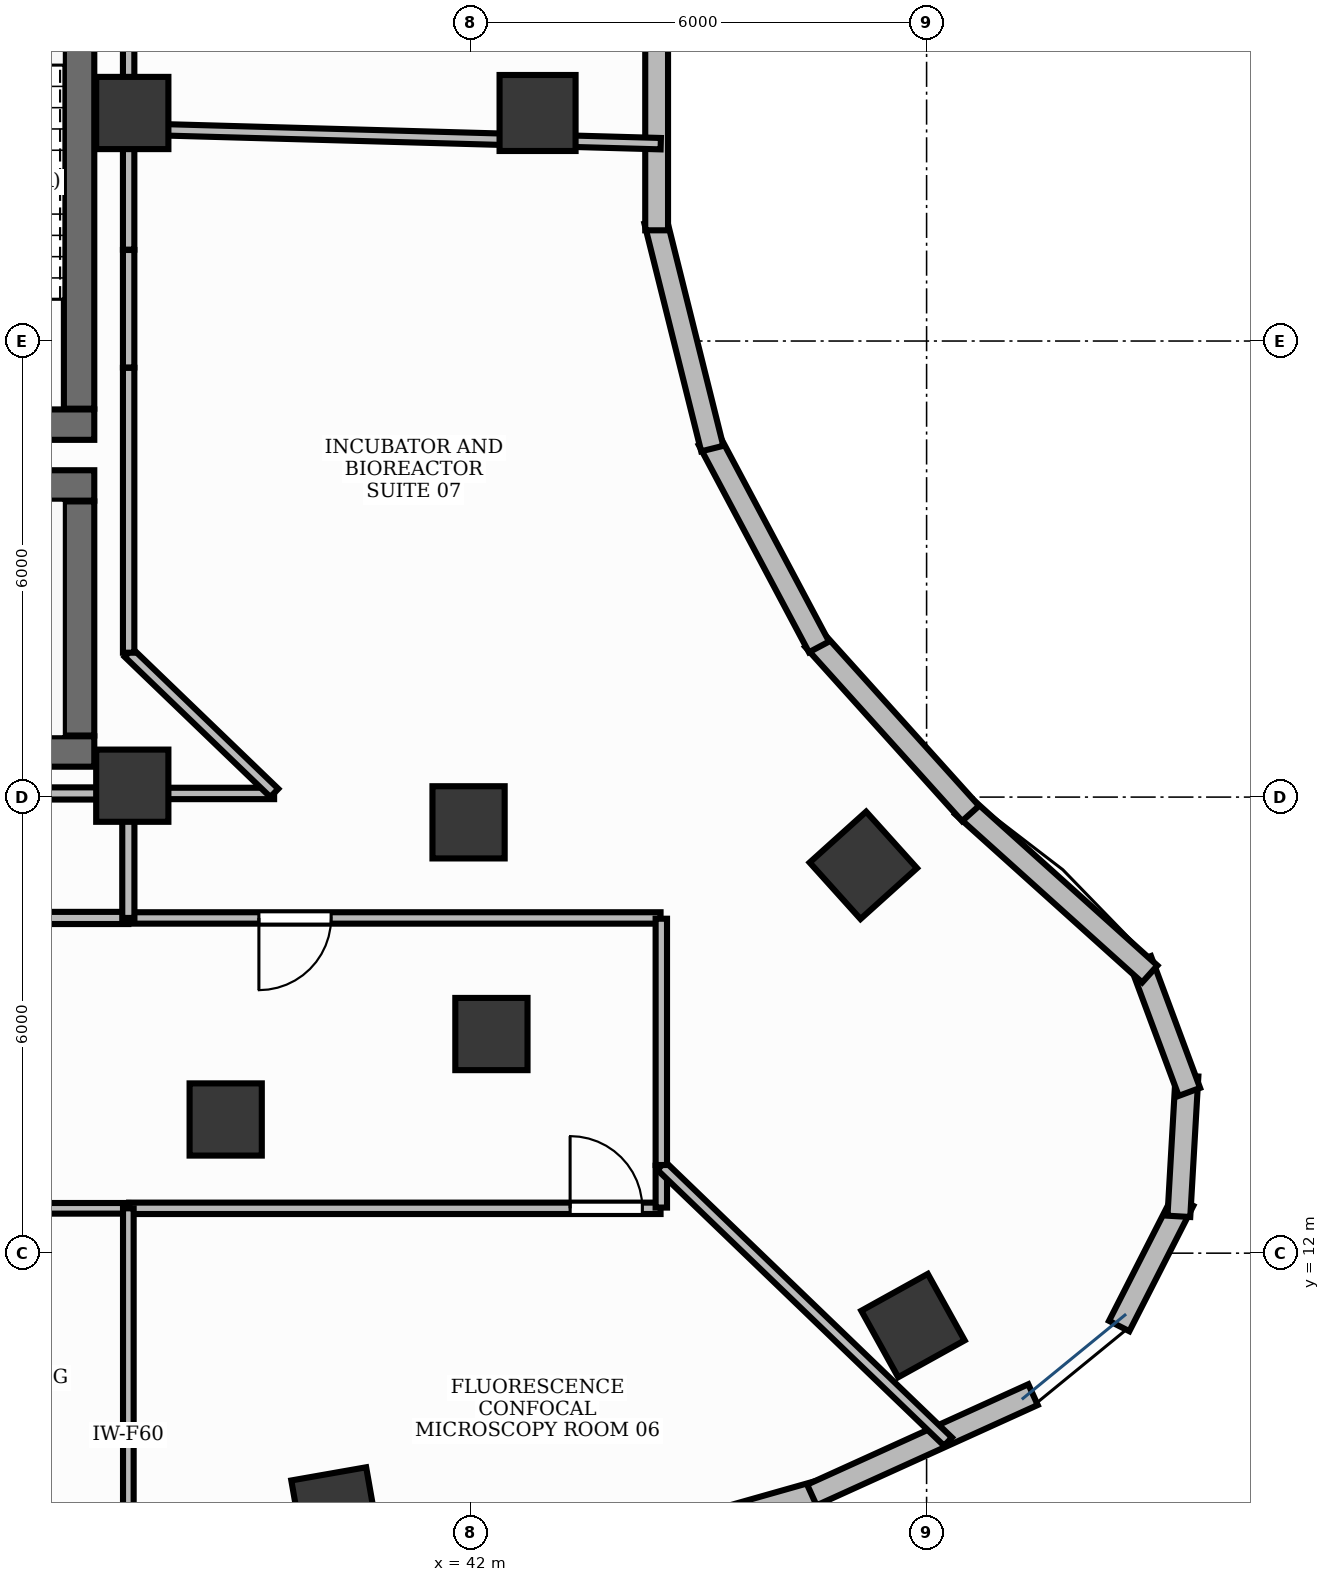
"""IFC4 building model, lengths in metres.
Left out: names, types, materials, properties, quantities, classifications, styles, units other than length and angle.
Written with IfcOpenShell. Run it as: python <this file> out.ifc"""

import sys

from ifc_helpers import new_model, si_unit, direction, frame, frame_2d, origin, origin_2d, place, context, subcontext, project, spatial, rectangle, extrude, element, fill, save


model = new_model("IFC4")
c1 = context("Model", 3, precision=1e-05, world=origin(), true_north=direction((0.0, 1.0)))
c2 = subcontext(c1, "Body", "Model", "MODEL_VIEW")
j1 = project(units=[si_unit("LENGTHUNIT", "METRE"), si_unit("PLANEANGLEUNIT", "RADIAN")], contexts=[c1])
p1 = place(None, origin())
s1 = spatial("IfcSite", under=j1, at=p1, CompositionType="ELEMENT")
p2 = place(p1, origin())
s2 = spatial("IfcBuilding", under=s1, at=p2, CompositionType="ELEMENT")
p3 = place(p2, frame((0.0, 0.0, 158.4)))
s3 = spatial("IfcBuildingStorey", under=s2, at=p3, CompositionType="ELEMENT", Elevation=158.4)
p4 = place(p3, frame((28.852, 18.6, 0.0), z_axis=(0.0, 0.0, 1.0), x_axis=(1.0, 0.0, 0.0)))
e1 = element("IfcWall", 1, at=p4, inside=s3, PredefinedType="SHEAR", context=c2, shape_type="SweptSolid", body=[
    extrude(rectangle(XDim=8.198, YDim=0.4, at=frame_2d((4.099, 0.0))), origin(), (0.0, 0.0, 1.0), 3.9),
])
p5 = place(p3, frame((28.4, 22.1, 0.0), z_axis=(0.0, 0.0, 1.0), x_axis=(1.0, 0.0, 0.0)))
e2 = element("IfcWall", 2, at=p5, inside=s3, PredefinedType="SHEAR", context=c2, shape_type="SweptSolid", body=[
    extrude(rectangle(XDim=8.65, YDim=0.4, at=frame_2d((4.325, 0.0))), origin(), (0.0, 0.0, 1.0), 3.9),
])
p6 = place(p3, frame((36.85, 18.81, 0.0), z_axis=(0.0, 0.0, 1.0), x_axis=(0.0, 1.0, 0.0)))
e3 = element("IfcWall", 3, at=p6, inside=s3, PredefinedType="SHEAR", context=c2, shape_type="SweptSolid", body=[
    extrude(rectangle(XDim=3.08, YDim=0.4, at=frame_2d((1.54, 0.0))), origin(), (0.0, 0.0, 1.0), 3.9),
])
p7 = place(p3, frame((33.15, 22.9, 0.0), z_axis=(0.0, 0.0, 1.0), x_axis=(1.0, 0.0, 0.0)))
e4 = element("IfcWall", 4, at=p7, inside=s3, PredefinedType="SHEAR", context=c2, shape_type="SweptSolid", body=[
    extrude(rectangle(XDim=3.9, YDim=0.4, at=frame_2d((1.95, 0.0))), origin(), (0.0, 0.0, 1.0), 3.9),
])
p8 = place(p3, frame((36.85, 23.11, 0.0), z_axis=(0.0, 0.0, 1.0), x_axis=(0.0, 1.0, 0.0)))
e5 = element("IfcWall", 5, at=p8, inside=s3, PredefinedType="SHEAR", context=c2, shape_type="SweptSolid", body=[
    extrude(rectangle(XDim=7.78, YDim=0.4, at=frame_2d((3.89, 0.0))), origin(), (0.0, 0.0, 1.0), 3.9),
])
for number, where, z_axis, x_axis in (
    (6, (37.55, 18.15, -0.0), (0.0, 0.0, 1.0), (1.0, 0.0, 0.0)),
    (7, (37.55, 27.0, -0.0), (0.0, 0.0, 1.0), (1.0, 0.0, 0.0)),
):
    element("IfcColumn", number, at=place(p3, frame(where, z_axis=z_axis, x_axis=x_axis)), inside=s3, PredefinedType="PILASTER", context=c2, shape_type="SweptSolid", body=[
        extrude(rectangle(XDim=0.95, YDim=0.95, at=origin_2d()), origin(), (0.0, 0.0, 1.0), 3.901),
    ])
p9 = place(p3, frame((40.221, 8.604, -0.0), z_axis=(0.0, 0.0, 1.0), x_axis=(0.984868307662, 0.173304404339, 0.0)))
e8 = element("IfcColumn", 8, at=p9, inside=s3, PredefinedType="COLUMN", context=c2, shape_type="SweptSolid", body=[
    extrude(rectangle(XDim=1.0, YDim=1.0, at=origin_2d()), origin(), (0.0, 0.0, 1.0), 3.901),
])
p10 = place(p3, frame((38.779, 13.759, -0.0), z_axis=(0.0, 0.0, 1.0), x_axis=(1.0, 0.0, 0.0)))
e9 = element("IfcColumn", 9, at=p10, inside=s3, PredefinedType="COLUMN", context=c2, shape_type="SweptSolid", body=[
    extrude(rectangle(XDim=0.95, YDim=0.95, at=origin_2d()), origin(), (0.0, 0.0, 1.0), 3.901),
])
p11 = place(p3, frame((47.821, 11.047, -0.0), z_axis=(0.0, 0.0, 1.0), x_axis=(0.874535078577, 0.484962262797, 0.0)))
e10 = element("IfcColumn", 10, at=p11, inside=s3, PredefinedType="COLUMN", context=c2, shape_type="SweptSolid", body=[
    extrude(rectangle(XDim=1.0, YDim=1.0, at=origin_2d()), origin(), (0.0, 0.0, 1.0), 3.901),
])
p12 = place(p3, frame((42.275, 14.883, -0.0), z_axis=(0.0, 0.0, 1.0), x_axis=(1.0, 0.0, 0.0)))
e11 = element("IfcColumn", 11, at=p12, inside=s3, PredefinedType="COLUMN", context=c2, shape_type="SweptSolid", body=[
    extrude(rectangle(XDim=0.95, YDim=0.95, at=origin_2d()), origin(), (0.0, 0.0, 1.0), 3.901),
])
p13 = place(p3, frame((47.167, 17.102, -0.0), z_axis=(0.0, 0.0, 1.0), x_axis=(-0.669130606359, 0.743144825477, 0.0)))
e12 = element("IfcColumn", 12, at=p13, inside=s3, PredefinedType="COLUMN", context=c2, shape_type="SweptSolid", body=[
    extrude(rectangle(XDim=1.0, YDim=1.0, at=origin_2d()), origin(), (0.0, 0.0, 1.0), 3.901),
])
p14 = place(p3, frame((41.974, 17.668, -0.0), z_axis=(0.0, 0.0, 1.0), x_axis=(1.0, 0.0, 0.0)))
e13 = element("IfcColumn", 13, at=p14, inside=s3, PredefinedType="COLUMN", context=c2, shape_type="SweptSolid", body=[
    extrude(rectangle(XDim=0.95, YDim=0.95, at=origin_2d()), origin(), (0.0, 0.0, 1.0), 3.901),
])
p15 = place(p3, frame((42.882, 27.0, -0.0), z_axis=(0.0, 0.0, 1.0), x_axis=(0.0, 1.0, 0.0)))
e14 = element("IfcColumn", 14, at=p15, inside=s3, PredefinedType="COLUMN", context=c2, shape_type="SweptSolid", body=[
    extrude(rectangle(XDim=1.0, YDim=1.0, at=origin_2d()), origin(), (0.0, 0.0, 1.0), 3.901),
])
p16 = place(p3, frame((40.493, 7.134, 0.0), z_axis=(0.0, 0.0, 1.0), x_axis=(0.962163849422, 0.272471515694, 0.0)))
e15 = element("IfcWall", 15, at=p16, inside=s3, PredefinedType="STANDARD", context=c2, shape_type="SweptSolid", body=[
    extrude(rectangle(XDim=6.409, YDim=0.3, at=frame_2d((3.205, 0.0))), origin(), (0.0, 0.0, 1.0), 3.9),
])
p17 = place(p3, frame((46.49, 8.818, 0.0), z_axis=(0.0, 0.0, 1.0), x_axis=(0.910633193525, 0.413215666268, 0.0)))
e16 = element("IfcWall", 16, at=p17, inside=s3, PredefinedType="STANDARD", context=c2, shape_type="SweptSolid", body=[
    extrude(rectangle(XDim=3.195, YDim=0.3, at=frame_2d((1.598, 0.0))), origin(), (0.0, 0.0, 1.0), 3.9),
])
for number, where, z_axis, x_axis in (
    (17, (50.534, 11.041, 0.0), (0.0, 0.0, 1.0), (0.454, 0.891, 0.0)),
    (18, (51.319, 12.484, 0.0), (0.0, 0.0, 1.0), (0.057, 0.998, 0.0)),
    (19, (51.458, 14.121, 0.0), (0.0, 0.0, 1.0), (-0.349, 0.937, 0.0)),
):
    element("IfcWall", number, at=place(p3, frame(where, z_axis=z_axis, x_axis=x_axis)), inside=s3, PredefinedType="STANDARD", context=c2, shape_type="SweptSolid", body=[
        extrude(rectangle(XDim=1.852, YDim=0.3, at=frame_2d((0.926, 0.0))), origin(), (0.0, 0.0, 1.0), 3.9),
    ])
p18 = place(p3, frame((50.936, 15.673, 0.0), z_axis=(0.0, 0.0, 1.0), x_axis=(-0.743341827472, 0.668911748687, 0.0)))
e20 = element("IfcWall", 20, at=p18, inside=s3, PredefinedType="STANDARD", context=c2, shape_type="SweptSolid", body=[
    extrude(rectangle(XDim=3.31, YDim=0.3, at=frame_2d((1.655, 0.0))), origin(), (0.0, 0.0, 1.0), 3.9),
])
for number, where, z_axis, x_axis in (
    (21, (48.579, 17.784, 0.0), (0.0, 0.0, 1.0), (-0.669, 0.743, 0.0)),
    (22, (46.584, 19.976, 0.0), (0.0, 0.0, 1.0), (-0.469, 0.883, 0.0)),
    (23, (45.18, 22.585, 0.0), (0.0, 0.0, 1.0), (-0.242, 0.97, 0.0)),
    (24, (44.448, 25.457, 0.0), (0.0, 0.0, 1.0), (0.0, 1.0, 0.0)),
):
    element("IfcWall", number, at=place(p3, frame(where, z_axis=z_axis, x_axis=x_axis)), inside=s3, PredefinedType="STANDARD", context=c2, shape_type="SweptSolid", body=[
        extrude(rectangle(XDim=3.087, YDim=0.3, at=frame_2d((1.543, 0.0))), origin(), (0.0, 0.0, 1.0), 3.9),
    ])
p19 = place(p3, frame((37.498, 16.41, 0.0), z_axis=(0.0, 0.0, 1.0), x_axis=(-1.0, 0.0, 0.0)))
e25 = element("IfcWall", 25, at=p19, inside=s3, PredefinedType="PARTITIONING", context=c2, shape_type="SweptSolid", body=[
    extrude(rectangle(XDim=8.498, YDim=0.16, at=frame_2d((4.249, 0.0))), origin(), (0.0, 0.0, 1.0), 2.91),
])
p20 = place(p19, frame((3.372, 0.0, 0.0)))
e26 = element("IfcOpeningElement", 26, at=p20, cuts=e25, PredefinedType="OPENING", context=c2, shape_type="SweptSolid", body=[
    extrude(rectangle(XDim=0.95, YDim=2.15, at=frame_2d((0.475, 1.075))), frame((0.0, 0.095, 0.0), z_axis=(0.0, -1.0, 0.0), x_axis=(1.0, 0.0, 0.0)), (0.0, 0.0, 1.0), 0.19),
])
p21 = place(p3, frame((32.695, 12.59, 0.0), z_axis=(0.0, 0.0, 1.0), x_axis=(1.0, 0.0, 0.0)))
e27 = element("IfcWall", 27, at=p21, inside=s3, PredefinedType="PARTITIONING", context=c2, shape_type="SweptSolid", body=[
    extrude(rectangle(XDim=4.803, YDim=0.14, at=frame_2d((2.401, 0.0))), origin(), (0.0, 0.0, 1.0), 2.91),
])
p22 = place(p21, frame((0.24, 0.0, 0.0)))
e28 = element("IfcOpeningElement", 28, at=p22, cuts=e27, PredefinedType="OPENING", context=c2, shape_type="SweptSolid", body=[
    extrude(rectangle(XDim=0.95, YDim=2.15, at=frame_2d((0.475, 1.075))), frame((0.0, 0.085, 0.0), z_axis=(0.0, -1.0, 0.0), x_axis=(1.0, 0.0, 0.0)), (0.0, 0.0, 1.0), 0.17),
])
p23 = place(p3, frame((37.508, 12.59, 0.0), z_axis=(0.0, 0.0, 1.0), x_axis=(1.0, 0.0, 0.0)))
e29 = element("IfcWall", 29, at=p23, inside=s3, PredefinedType="PARTITIONING", context=c2, shape_type="SweptSolid", body=[
    extrude(rectangle(XDim=6.992, YDim=0.15, at=frame_2d((3.496, 0.0))), origin(), (0.0, 0.0, 1.0), 2.91),
])
p24 = place(p23, frame((5.802, 0.0, 0.0)))
e30 = element("IfcOpeningElement", 30, at=p24, cuts=e29, PredefinedType="OPENING", context=c2, shape_type="SweptSolid", body=[
    extrude(rectangle(XDim=0.95, YDim=2.15, at=frame_2d((0.475, 1.075))), frame((0.0, 0.09, 0.0), z_axis=(0.0, -1.0, 0.0), x_axis=(1.0, 0.0, 0.0)), (0.0, 0.0, 1.0), 0.18),
])
p25 = place(p3, frame((44.5, 16.41, 0.0), z_axis=(0.0, 0.0, 1.0), x_axis=(-1.0, 0.0, 0.0)))
e31 = element("IfcWall", 31, at=p25, inside=s3, PredefinedType="PARTITIONING", context=c2, shape_type="SweptSolid", body=[
    extrude(rectangle(XDim=6.992, YDim=0.15, at=frame_2d((3.496, 0.0))), origin(), (0.0, 0.0, 1.0), 2.91),
])
p26 = place(p25, frame((4.334, 0.0, 0.0)))
e32 = element("IfcOpeningElement", 32, at=p26, cuts=e31, PredefinedType="OPENING", context=c2, shape_type="SweptSolid", body=[
    extrude(rectangle(XDim=0.95, YDim=2.15, at=frame_2d((0.475, 1.075))), frame((0.0, 0.09, 0.0), z_axis=(0.0, -1.0, 0.0), x_axis=(1.0, 0.0, 0.0)), (0.0, 0.0, 1.0), 0.18),
])
p27 = place(p3, frame((31.717, 18.048, 0.0), z_axis=(0.0, 0.0, 1.0), x_axis=(1.0, 0.0, 0.0)))
e33 = element("IfcWall", 33, at=p27, inside=s3, PredefinedType="PARTITIONING", context=c2, shape_type="SweptSolid", body=[
    extrude(rectangle(XDim=5.781, YDim=0.16, at=frame_2d((2.89, 0.0))), origin(), (0.0, 0.0, 1.0), 2.91),
])
p28 = place(p3, frame((37.498, 18.048, 0.0), z_axis=(0.0, 0.0, 1.0), x_axis=(0.0, -1.0, 0.0)))
e34 = element("IfcWall", 34, at=p28, inside=s3, PredefinedType="PARTITIONING", context=c2, shape_type="SweptSolid", body=[
    extrude(rectangle(XDim=1.638, YDim=0.16, at=frame_2d((0.819, 0.0))), origin(), (0.0, 0.0, 1.0), 2.91),
])
p29 = place(p3, frame((37.498, 12.59, 0.0), z_axis=(0.0, 0.0, 1.0), x_axis=(0.0, -1.0, 0.0)))
e35 = element("IfcWall", 35, at=p29, inside=s3, PredefinedType="PARTITIONING", context=c2, shape_type="SweptSolid", body=[
    extrude(rectangle(XDim=5.963, YDim=0.14, at=frame_2d((2.981, 0.0))), origin(), (0.0, 0.0, 1.0), 2.91),
])
p30 = place(p3, frame((44.51, 12.6, 0.0), z_axis=(0.0, 0.0, 1.0), x_axis=(0.0, 1.0, 0.0)))
e36 = element("IfcWall", 36, at=p30, inside=s3, PredefinedType="PARTITIONING", context=c2, shape_type="SweptSolid", body=[
    extrude(rectangle(XDim=0.55, YDim=0.15, at=frame_2d((0.275, 0.0))), origin(), (0.0, 0.0, 1.0), 2.91),
])
p31 = place(p3, frame((44.51, 13.15, 0.0), z_axis=(0.0, 0.0, 1.0), x_axis=(0.720549773239, -0.69340321912, 0.0)))
e37 = element("IfcWall", 37, at=p31, inside=s3, PredefinedType="PARTITIONING", context=c2, shape_type="SweptSolid", body=[
    extrude(rectangle(XDim=5.234, YDim=0.15, at=frame_2d((2.617, 0.0))), origin(), (0.0, 0.0, 1.0), 2.91),
])
p32 = place(p3, frame((37.502, 26.792, 0.0), z_axis=(0.0, 0.0, 1.0), x_axis=(0.999610026888, -0.027924794459, 0.0)))
e38 = element("IfcWall", 38, at=p32, inside=s3, PredefinedType="PARTITIONING", context=c2, shape_type="SweptSolid", body=[
    extrude(rectangle(XDim=7.003, YDim=0.15, at=frame_2d((3.501, 0.0))), origin(), (0.0, 0.0, 1.0), 2.91),
])
p33 = place(p3, frame((44.51, 13.16, 0.0), z_axis=(0.0, 0.0, 1.0), x_axis=(0.0, 1.0, 0.0)))
e39 = element("IfcWall", 39, at=p33, inside=s3, PredefinedType="PARTITIONING", context=c2, shape_type="SweptSolid", body=[
    extrude(rectangle(XDim=3.24, YDim=0.15, at=frame_2d((1.62, 0.0))), origin(), (0.0, 0.0, 1.0), 2.91),
])
p34 = place(p3, frame((37.508, 18.048, 0.0), z_axis=(0.0, 0.0, 1.0), x_axis=(1.0, 0.0, 0.0)))
e40 = element("IfcWall", 40, at=p34, inside=s3, PredefinedType="PARTITIONING", context=c2, shape_type="SweptSolid", body=[
    extrude(rectangle(XDim=1.908, YDim=0.15, at=frame_2d((0.954, 0.0))), origin(), (0.0, 0.0, 1.0), 2.91),
])
p35 = place(p3, frame((39.419, 18.055, 0.0), z_axis=(0.0, 0.0, 1.0), x_axis=(-0.720561375154, 0.693391162791, 0.0)))
e41 = element("IfcWall", 41, at=p35, inside=s3, PredefinedType="PARTITIONING", context=c2, shape_type="SweptSolid", body=[
    extrude(rectangle(XDim=2.66, YDim=0.15, at=frame_2d((1.33, 0.0))), origin(), (0.0, 0.0, 1.0), 2.91),
])
p36 = place(p3, frame((37.502, 19.899, 0.0), z_axis=(0.0, 0.0, 1.0), x_axis=(0.0, 1.0, 0.0)))
e42 = element("IfcWall", 42, at=p36, inside=s3, PredefinedType="PARTITIONING", context=c2, shape_type="SweptSolid", body=[
    extrude(rectangle(XDim=3.749, YDim=0.15, at=frame_2d((1.874, 0.0))), origin(), (0.0, 0.0, 1.0), 2.91),
])
p37 = place(p3, frame((37.502, 23.652, 0.0), z_axis=(0.0, 0.0, 1.0), x_axis=(0.0, 1.0, 0.0)))
e43 = element("IfcWall", 43, at=p37, inside=s3, PredefinedType="PARTITIONING", context=c2, shape_type="SweptSolid", body=[
    extrude(rectangle(XDim=1.546, YDim=0.15, at=frame_2d((0.773, 0.0))), origin(), (0.0, 0.0, 1.0), 2.91),
])
p38 = place(p3, frame((37.502, 25.202, 0.0), z_axis=(0.0, 0.0, 1.0), x_axis=(0.0, 1.0, 0.0)))
e44 = element("IfcWall", 44, at=p38, inside=s3, PredefinedType="PARTITIONING", context=c2, shape_type="SweptSolid", body=[
    extrude(rectangle(XDim=1.589, YDim=0.15, at=frame_2d((0.795, 0.0))), origin(), (0.0, 0.0, 1.0), 2.91),
])
p39 = place(p3, frame((37.502, 26.802, 0.0), z_axis=(0.0, 0.0, 1.0), x_axis=(0.0, 1.0, 0.0)))
e45 = element("IfcWall", 45, at=p39, inside=s3, PredefinedType="PARTITIONING", context=c2, shape_type="SweptSolid", body=[
    extrude(rectangle(XDim=8.107, YDim=0.15, at=frame_2d((4.053, 0.0))), origin(), (0.0, 0.0, 1.0), 2.91),
])
p40 = place(p24, origin())
e46 = element("IfcDoor", 46, at=p40, inside=s3, OperationType="SINGLE_SWING_LEFT", PredefinedType="DOOR", context=c2, shape_type="SweptSolid", body=[
    extrude(rectangle(XDim=0.95, YDim=2.15, at=frame_2d((0.475, 1.075))), frame((0.0, 0.025, 0.0), z_axis=(0.0, -1.0, 0.0), x_axis=(1.0, 0.0, 0.0)), (0.0, 0.0, 1.0), 0.05),
])
fill(e30, e46)
p41 = place(p26, origin())
e47 = element("IfcDoor", 47, at=p41, inside=s3, OperationType="SINGLE_SWING_RIGHT", PredefinedType="DOOR", context=c2, shape_type="SweptSolid", body=[
    extrude(rectangle(XDim=0.95, YDim=2.15, at=frame_2d((0.475, 1.075))), frame((0.0, 0.025, 0.0), z_axis=(0.0, -1.0, 0.0), x_axis=(1.0, 0.0, 0.0)), (0.0, 0.0, 1.0), 0.05),
])
fill(e32, e47)
save(model, sys.argv[1])
